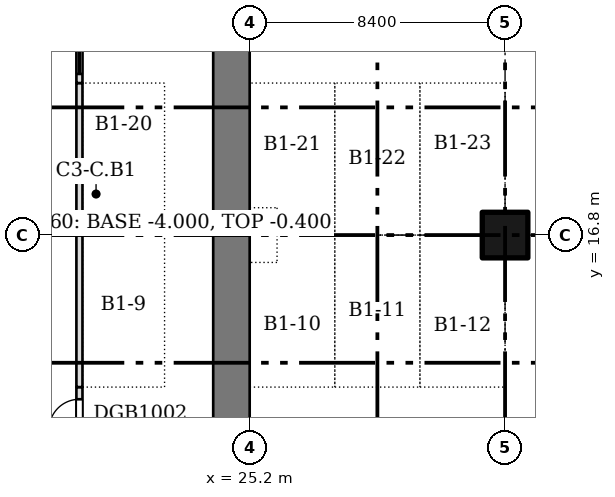
"""IFC4 building model, lengths in metres.
Left out: names, types, materials, properties, quantities, classifications, styles, units other than length and angle.
Written with IfcOpenShell. Run it as: python <this file> out.ifc"""

import sys

from ifc_helpers import new_model, si_unit, direction, frame, frame_2d, origin, origin_2d, place, context, subcontext, project, spatial, rectangle, extrude, element, fill, save


model = new_model("IFC4")
c1 = context("Model", 3, precision=1e-05, world=origin(), true_north=direction((0.0, 1.0)))
c2 = subcontext(c1, "Body", "Model", "MODEL_VIEW")
j1 = project(units=[si_unit("LENGTHUNIT", "METRE"), si_unit("PLANEANGLEUNIT", "RADIAN")], contexts=[c1])
p1 = place(None, origin())
s1 = spatial("IfcSite", under=j1, at=p1, CompositionType="ELEMENT")
p2 = place(p1, origin())
s2 = spatial("IfcBuilding", under=s1, at=p2, CompositionType="ELEMENT")
p3 = place(p2, frame((0.0, 0.0, -4.0)))
s3 = spatial("IfcBuildingStorey", under=s2, at=p3, CompositionType="ELEMENT", Elevation=-4.0)
p4 = place(p3, frame((24.6, 0.0, 0.0), z_axis=(0.0, 0.0, 1.0), x_axis=(0.0, 1.0, 0.0)))
e1 = element("IfcWall", 1, at=p4, inside=s3, PredefinedType="SHEAR", context=c2, shape_type="SweptSolid", body=[
    extrude(rectangle(XDim=25.2, YDim=1.2, at=frame_2d((12.6, 0.0))), origin(), (0.0, 0.0, 1.0), 3.6),
])
p5 = place(p3, frame((33.6, 16.8, 0.0), z_axis=(0.0, 0.0, 1.0), x_axis=(1.0, 0.0, 0.0)))
e2 = element("IfcColumn", 2, at=p5, inside=s3, PredefinedType="COLUMN", context=c2, shape_type="SweptSolid", body=[
    extrude(rectangle(XDim=1.5, YDim=1.5, at=origin_2d()), origin(), (0.0, 0.0, 1.0), 3.6),
])
p6 = place(p3, frame((19.6, 5.0, 0.0), z_axis=(0.0, 0.0, 1.0), x_axis=(0.0, 1.0, 0.0)))
e3 = element("IfcWall", 3, at=p6, inside=s3, PredefinedType="PARTITIONING", context=c2, shape_type="SweptSolid", body=[
    extrude(rectangle(XDim=6.8, YDim=0.2, at=frame_2d((3.4, 0.0))), origin(), (0.0, 0.0, 1.0), 3.6),
])
p7 = place(p6, frame((0.3, 0.0, 0.0)))
e4 = element("IfcOpeningElement", 4, at=p7, cuts=e3, PredefinedType="OPENING", context=c2, shape_type="SweptSolid", body=[
    extrude(rectangle(XDim=4.8, YDim=2.4, at=frame_2d((2.4, 1.2))), frame((0.0, 0.11, 0.0), z_axis=(0.0, -1.0, 0.0), x_axis=(1.0, 0.0, 0.0)), (0.0, 0.0, 1.0), 0.22),
])
p8 = place(p6, frame((5.4, 0.0, 0.0)))
e5 = element("IfcOpeningElement", 5, at=p8, cuts=e3, PredefinedType="OPENING", context=c2, shape_type="SweptSolid", body=[
    extrude(rectangle(XDim=1.0, YDim=2.1, at=frame_2d((0.5, 1.05))), frame((0.0, 0.11, 0.0), z_axis=(0.0, -1.0, 0.0), x_axis=(1.0, 0.0, 0.0)), (0.0, 0.0, 1.0), 0.22),
])
p9 = place(p3, frame((19.6, 11.8, 0.0), z_axis=(0.0, 0.0, 1.0), x_axis=(0.0, 1.0, 0.0)))
e6 = element("IfcWall", 6, at=p9, inside=s3, PredefinedType="PARTITIONING", context=c2, shape_type="SweptSolid", body=[
    extrude(rectangle(XDim=10.0, YDim=0.2, at=frame_2d((5.0, 0.0))), origin(), (0.0, 0.0, 1.0), 3.6),
])
p10 = place(p3, frame((19.6, 21.8, 0.0), z_axis=(0.0, 0.0, 1.0), x_axis=(0.0, 1.0, 0.0)))
e7 = element("IfcWall", 7, at=p10, inside=s3, PredefinedType="PARTITIONING", context=c2, shape_type="SweptSolid", body=[
    extrude(rectangle(XDim=6.8, YDim=0.2, at=frame_2d((3.4, 0.0))), origin(), (0.0, 0.0, 1.0), 3.6),
])
p11 = place(p10, frame((0.3, 0.0, 0.0)))
e8 = element("IfcOpeningElement", 8, at=p11, cuts=e7, PredefinedType="OPENING", context=c2, shape_type="SweptSolid", body=[
    extrude(rectangle(XDim=4.8, YDim=2.4, at=frame_2d((2.4, 1.2))), frame((0.0, 0.11, 0.0), z_axis=(0.0, -1.0, 0.0), x_axis=(1.0, 0.0, 0.0)), (0.0, 0.0, 1.0), 0.22),
])
p12 = place(p10, frame((5.4, 0.0, 0.0)))
e9 = element("IfcOpeningElement", 9, at=p12, cuts=e7, PredefinedType="OPENING", context=c2, shape_type="SweptSolid", body=[
    extrude(rectangle(XDim=1.0, YDim=2.1, at=frame_2d((0.5, 1.05))), frame((0.0, 0.11, 0.0), z_axis=(0.0, -1.0, 0.0), x_axis=(1.0, 0.0, 0.0)), (0.0, 0.0, 1.0), 0.22),
])
p13 = place(p8, origin())
e10 = element("IfcDoor", 10, at=p13, inside=s3, OperationType="SINGLE_SWING_LEFT", PredefinedType="DOOR", context=c2, shape_type="SweptSolid", body=[
    extrude(rectangle(XDim=1.0, YDim=2.1, at=frame_2d((0.5, 1.05))), frame((0.0, 0.025, 0.0), z_axis=(0.0, -1.0, 0.0), x_axis=(1.0, 0.0, 0.0)), (0.0, 0.0, 1.0), 0.05),
])
fill(e5, e10)
p14 = place(p11, origin())
e11 = element("IfcDoor", 11, at=p14, inside=s3, OperationType="ROLLINGUP", PredefinedType="GATE", context=c2, shape_type="SweptSolid", body=[
    extrude(rectangle(XDim=4.8, YDim=2.4, at=frame_2d((2.4, 1.2))), frame((0.0, 0.025, 0.0), z_axis=(0.0, -1.0, 0.0), x_axis=(1.0, 0.0, 0.0)), (0.0, 0.0, 1.0), 0.05),
])
fill(e8, e11)
save(model, sys.argv[1])
